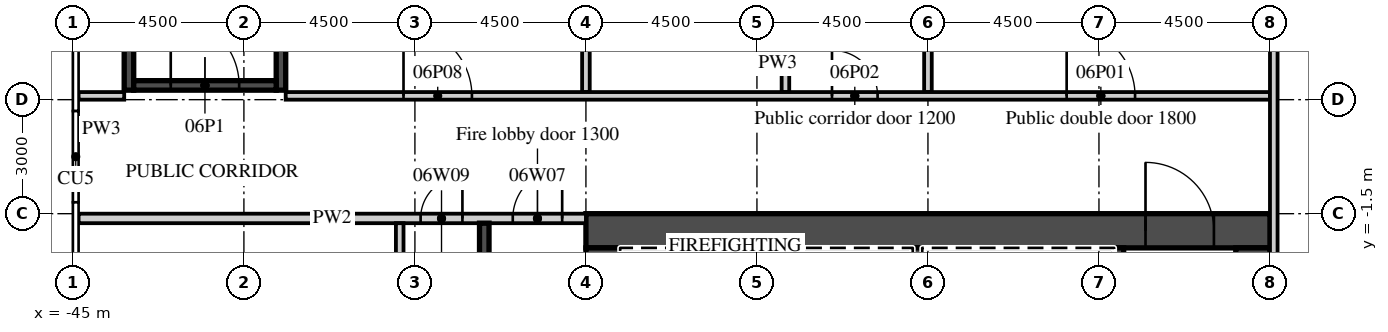
"""IFC4 building model, lengths in metres.
Left out: names, types, materials, properties, quantities, classifications, styles, units other than length and angle.
Written with IfcOpenShell. Run it as: python <this file> out.ifc"""

import sys

from ifc_helpers import new_model, si_unit, direction, frame, frame_2d, origin, place, context, subcontext, project, spatial, rectangle, extrude, element, fill, save


model = new_model("IFC4")
c1 = context("Model", 3, precision=1e-05, world=origin(), true_north=direction((0.0, 1.0)))
c2 = subcontext(c1, "Body", "Model", "MODEL_VIEW")
j1 = project(units=[si_unit("LENGTHUNIT", "METRE"), si_unit("PLANEANGLEUNIT", "RADIAN")], contexts=[c1])
p1 = place(None, origin())
s1 = spatial("IfcSite", under=j1, at=p1, CompositionType="ELEMENT")
p2 = place(p1, origin())
s2 = spatial("IfcBuilding", under=s1, at=p2, CompositionType="ELEMENT")
p3 = place(p2, frame((0.0, 0.0, 38.0)))
s3 = spatial("IfcBuildingStorey", under=s2, at=p3, CompositionType="ELEMENT", Elevation=38.0)
p4 = place(p3, frame((-31.5, -1.95, 0.0), z_axis=(0.0, 0.0, 1.0), x_axis=(1.0, 0.0, 0.0)))
e1 = element("IfcWall", 1, at=p4, inside=s3, PredefinedType="SHEAR", context=c2, shape_type="SweptSolid", body=[
    extrude(rectangle(XDim=18.0, YDim=0.9, at=frame_2d((9.0, 0.0))), origin(), (0.0, 0.0, 1.0), 8.7),
])
p5 = place(p4, frame((14.725, 0.0, 0.0)))
e2 = element("IfcOpeningElement", 2, at=p5, cuts=e1, PredefinedType="OPENING", context=c2, shape_type="SweptSolid", body=[
    extrude(rectangle(XDim=1.8, YDim=2.1, at=frame_2d((0.9, 1.05))), frame((0.0, 0.46, 0.0), z_axis=(0.0, -1.0, 0.0), x_axis=(1.0, 0.0, 0.0)), (0.0, 0.0, 1.0), 0.92),
])
p6 = place(p3, frame((-31.05, -15.2, 0.0), z_axis=(0.0, 0.0, 1.0), x_axis=(0.0, 1.0, 0.0)))
e3 = element("IfcWall", 3, at=p6, inside=s3, PredefinedType="SHEAR", context=c2, shape_type="SweptSolid", body=[
    extrude(rectangle(XDim=12.8, YDim=0.9, at=frame_2d((6.4, 0.0))), origin(), (0.0, 0.0, 1.0), 8.7),
])
p7 = place(p6, frame((11.5, 0.0, 0.0)))
e4 = element("IfcOpeningElement", 4, at=p7, cuts=e3, PredefinedType="OPENING", context=c2, shape_type="SweptSolid", body=[
    extrude(rectangle(XDim=1.1, YDim=2.1, at=frame_2d((0.55, 1.05))), frame((0.0, 0.46, 0.0), z_axis=(0.0, -1.0, 0.0), x_axis=(1.0, 0.0, 0.0)), (0.0, 0.0, 1.0), 0.92),
])
p8 = place(p3, frame((-13.95, -14.6, 0.0), z_axis=(0.0, 0.0, 1.0), x_axis=(0.0, 1.0, 0.0)))
e5 = element("IfcWall", 5, at=p8, inside=s3, PredefinedType="SHEAR", context=c2, shape_type="SweptSolid", body=[
    extrude(rectangle(XDim=12.2, YDim=0.9, at=frame_2d((6.1, 0.0))), origin(), (0.0, 0.0, 1.0), 8.7),
])
p9 = place(p3, frame((-17.475, -5.55, 0.0), z_axis=(0.0, 0.0, 1.0), x_axis=(0.0, 1.0, 0.0)))
e6 = element("IfcWall", 6, at=p9, inside=s3, PredefinedType="SHEAR", context=c2, shape_type="SweptSolid", body=[
    extrude(rectangle(XDim=3.15, YDim=0.25, at=frame_2d((1.575, 0.0))), origin(), (0.0, 0.0, 1.0), 8.7),
])
for number, where, z_axis, x_axis in (
    (7, (-27.975, -5.3, 0.0), (0.0, 0.0, 1.0), (0.0, 1.0, 0.0)),
    (8, (-22.775, -5.3, 0.0), (0.0, 0.0, 1.0), (0.0, 1.0, 0.0)),
):
    element("IfcWall", number, at=place(p3, frame(where, z_axis=z_axis, x_axis=x_axis)), inside=s3, PredefinedType="SHEAR", context=c2, shape_type="SweptSolid", body=[
        extrude(rectangle(XDim=2.9, YDim=0.25, at=frame_2d((1.45, 0.0))), origin(), (0.0, 0.0, 1.0), 8.7),
    ])
p10 = place(p3, frame((-44.85, -1.625, 0.0), z_axis=(0.0, 0.0, 1.0), x_axis=(1.0, 0.0, 0.0)))
e9 = element("IfcWall", 9, at=p10, inside=s3, PredefinedType="PARTITIONING", context=c2, shape_type="SweptSolid", body=[
    extrude(rectangle(XDim=13.35, YDim=0.25, at=frame_2d((6.675, 0.0))), origin(), (0.0, 0.0, 1.0), 8.7),
])
p11 = place(p10, frame((11.425, 0.0, 0.0)))
e10 = element("IfcOpeningElement", 10, at=p11, cuts=e9, PredefinedType="OPENING", context=c2, shape_type="SweptSolid", body=[
    extrude(rectangle(XDim=1.3, YDim=2.1, at=frame_2d((0.65, 1.05))), frame((0.0, 0.135, 0.0), z_axis=(0.0, -1.0, 0.0), x_axis=(1.0, 0.0, 0.0)), (0.0, 0.0, 1.0), 0.27),
])
p12 = place(p10, frame((9.0, 0.0, 0.0)))
e11 = element("IfcOpeningElement", 11, at=p12, cuts=e9, PredefinedType="OPENING", context=c2, shape_type="SweptSolid", body=[
    extrude(rectangle(XDim=1.1, YDim=2.1, at=frame_2d((0.55, 1.05))), frame((0.0, 0.135, 0.0), z_axis=(0.0, -1.0, 0.0), x_axis=(1.0, 0.0, 0.0)), (0.0, 0.0, 1.0), 0.27),
])
p13 = place(p3, frame((-34.175, -10.1, 0.0), z_axis=(0.0, 0.0, 1.0), x_axis=(0.0, 1.0, 0.0)))
e12 = element("IfcWall", 12, at=p13, inside=s3, PredefinedType="SHEAR", context=c2, shape_type="SweptSolid", body=[
    extrude(rectangle(XDim=8.35, YDim=0.25, at=frame_2d((4.175, 0.0))), origin(), (0.0, 0.0, 1.0), 8.7),
])
p14 = place(p3, frame((-36.4, -17.7, 0.0), z_axis=(0.0, 0.0, 1.0), x_axis=(0.0, 1.0, 0.0)))
e13 = element("IfcWall", 13, at=p14, inside=s3, PredefinedType="PARTITIONING", context=c2, shape_type="SweptSolid", body=[
    extrude(rectangle(XDim=15.95, YDim=0.2, at=frame_2d((7.975, 0.0))), origin(), (0.0, 0.0, 1.0), 8.7),
])
p15 = place(p14, frame((0.35, 0.0, 0.0)))
e14 = element("IfcOpeningElement", 14, at=p15, cuts=e13, PredefinedType="OPENING", context=c2, shape_type="SweptSolid", body=[
    extrude(rectangle(XDim=0.9, YDim=2.1, at=frame_2d((0.45, 1.05))), frame((0.0, 0.11, 0.0), z_axis=(0.0, -1.0, 0.0), x_axis=(1.0, 0.0, 0.0)), (0.0, 0.0, 1.0), 0.22),
])
for number, where, z_axis, x_axis in (
    (15, (-43.525, 1.75, 0.0), (0.0, 0.0, 1.0), (0.0, 1.0, 0.0)),
    (16, (-39.525, 1.75, 0.0), (0.0, 0.0, 1.0), (0.0, 1.0, 0.0)),
):
    element("IfcWall", number, at=place(p3, frame(where, z_axis=z_axis, x_axis=x_axis)), inside=s3, PredefinedType="SHEAR", context=c2, shape_type="SweptSolid", body=[
        extrude(rectangle(XDim=7.5, YDim=0.25, at=frame_2d((3.75, 0.0))), origin(), (0.0, 0.0, 1.0), 8.7),
    ])
p16 = place(p3, frame((-43.4, 1.875, 0.0), z_axis=(0.0, 0.0, 1.0), x_axis=(1.0, 0.0, 0.0)))
e17 = element("IfcWall", 17, at=p16, inside=s3, PredefinedType="SHEAR", context=c2, shape_type="SweptSolid", body=[
    extrude(rectangle(XDim=3.75, YDim=0.25, at=frame_2d((1.875, 0.0))), origin(), (0.0, 0.0, 1.0), 8.7),
])
p17 = place(p16, frame((0.975, 0.0, 0.0)))
e18 = element("IfcOpeningElement", 18, at=p17, cuts=e17, PredefinedType="OPENING", context=c2, shape_type="SweptSolid", body=[
    extrude(rectangle(XDim=1.8, YDim=2.1, at=frame_2d((0.9, 1.05))), frame((0.0, 0.135, 0.0), z_axis=(0.0, -1.0, 0.0), x_axis=(1.0, 0.0, 0.0)), (0.0, 0.0, 1.0), 0.27),
])
p18 = place(p3, frame((-22.5, 1.7, 0.0), z_axis=(0.0, 0.0, 1.0), x_axis=(0.0, 1.0, 0.0)))
e19 = element("IfcWall", 19, at=p18, inside=s3, PredefinedType="PARTITIONING", context=c2, shape_type="SweptSolid", body=[
    extrude(rectangle(XDim=19.85, YDim=0.2, at=frame_2d((9.925, 0.0))), origin(), (0.0, 0.0, 1.0), 8.7),
])
p19 = place(p3, frame((-26.25, 1.7, 0.0), z_axis=(0.0, 0.0, 1.0), x_axis=(0.0, 1.0, 0.0)))
e20 = element("IfcWall", 20, at=p19, inside=s3, PredefinedType="PARTITIONING", context=c2, shape_type="SweptSolid", body=[
    extrude(rectangle(XDim=15.65, YDim=0.2, at=frame_2d((7.825, 0.0))), origin(), (0.0, 0.0, 1.0), 8.7),
])
p20 = place(p19, frame((1.75, 0.0, 0.0)))
e21 = element("IfcOpeningElement", 21, at=p20, cuts=e20, PredefinedType="OPENING", context=c2, shape_type="SweptSolid", body=[
    extrude(rectangle(XDim=0.9, YDim=2.1, at=frame_2d((0.45, 1.05))), frame((0.0, 0.11, 0.0), z_axis=(0.0, -1.0, 0.0), x_axis=(1.0, 0.0, 0.0)), (0.0, 0.0, 1.0), 0.22),
])
p21 = place(p19, frame((6.3, 0.0, 0.0)))
e22 = element("IfcOpeningElement", 22, at=p21, cuts=e20, PredefinedType="OPENING", context=c2, shape_type="SweptSolid", body=[
    extrude(rectangle(XDim=0.9, YDim=2.1, at=frame_2d((0.45, 1.05))), frame((0.0, 0.11, 0.0), z_axis=(0.0, -1.0, 0.0), x_axis=(1.0, 0.0, 0.0)), (0.0, 0.0, 1.0), 0.22),
])
p22 = place(p19, frame((10.3, 0.0, 0.0)))
e23 = element("IfcOpeningElement", 23, at=p22, cuts=e20, PredefinedType="OPENING", context=c2, shape_type="SweptSolid", body=[
    extrude(rectangle(XDim=0.9, YDim=2.1, at=frame_2d((0.45, 1.05))), frame((0.0, 0.11, 0.0), z_axis=(0.0, -1.0, 0.0), x_axis=(1.0, 0.0, 0.0)), (0.0, 0.0, 1.0), 0.22),
])
p23 = place(p19, frame((13.725, 0.0, 0.0)))
e24 = element("IfcOpeningElement", 24, at=p23, cuts=e20, PredefinedType="OPENING", context=c2, shape_type="SweptSolid", body=[
    extrude(rectangle(XDim=0.9, YDim=2.1, at=frame_2d((0.45, 1.05))), frame((0.0, 0.11, 0.0), z_axis=(0.0, -1.0, 0.0), x_axis=(1.0, 0.0, 0.0)), (0.0, 0.0, 1.0), 0.22),
])
p24 = place(p3, frame((-31.5, 1.7, 0.0), z_axis=(0.0, 0.0, 1.0), x_axis=(0.0, 1.0, 0.0)))
e25 = element("IfcWall", 25, at=p24, inside=s3, PredefinedType="PARTITIONING", context=c2, shape_type="SweptSolid", body=[
    extrude(rectangle(XDim=19.85, YDim=0.2, at=frame_2d((9.925, 0.0))), origin(), (0.0, 0.0, 1.0), 8.7),
])
p25 = place(p3, frame((-39.4, 1.6, 0.0), z_axis=(0.0, 0.0, 1.0), x_axis=(1.0, 0.0, 0.0)))
e26 = element("IfcWall", 26, at=p25, inside=s3, PredefinedType="PARTITIONING", context=c2, shape_type="SweptSolid", body=[
    extrude(rectangle(XDim=25.9, YDim=0.2, at=frame_2d((12.95, 0.0))), origin(), (0.0, 0.0, 1.0), 8.7),
])
p26 = place(p25, frame((20.55, 0.0, 0.0)))
e27 = element("IfcOpeningElement", 27, at=p26, cuts=e26, PredefinedType="OPENING", context=c2, shape_type="SweptSolid", body=[
    extrude(rectangle(XDim=1.8, YDim=2.1, at=frame_2d((0.9, 1.05))), frame((0.0, 0.11, 0.0), z_axis=(0.0, -1.0, 0.0), x_axis=(1.0, 0.0, 0.0)), (0.0, 0.0, 1.0), 0.22),
])
p27 = place(p25, frame((14.375, 0.0, 0.0)))
e28 = element("IfcOpeningElement", 28, at=p27, cuts=e26, PredefinedType="OPENING", context=c2, shape_type="SweptSolid", body=[
    extrude(rectangle(XDim=1.2, YDim=2.1, at=frame_2d((0.6, 1.05))), frame((0.0, 0.11, 0.0), z_axis=(0.0, -1.0, 0.0), x_axis=(1.0, 0.0, 0.0)), (0.0, 0.0, 1.0), 0.22),
])
p28 = place(p25, frame((3.1, 0.0, 0.0)))
e29 = element("IfcOpeningElement", 29, at=p28, cuts=e26, PredefinedType="OPENING", context=c2, shape_type="SweptSolid", body=[
    extrude(rectangle(XDim=1.8, YDim=2.1, at=frame_2d((0.9, 1.05))), frame((0.0, 0.11, 0.0), z_axis=(0.0, -1.0, 0.0), x_axis=(1.0, 0.0, 0.0)), (0.0, 0.0, 1.0), 0.22),
])
p29 = place(p3, frame((-44.85, 1.6, 0.0), z_axis=(0.0, 0.0, 1.0), x_axis=(1.0, 0.0, 0.0)))
e30 = element("IfcWall", 30, at=p29, inside=s3, PredefinedType="PARTITIONING", context=c2, shape_type="SweptSolid", body=[
    extrude(rectangle(XDim=1.2, YDim=0.2, at=frame_2d((0.6, 0.0))), origin(), (0.0, 0.0, 1.0), 8.7),
])
p30 = place(p3, frame((-13.4, -17.5, 0.0), z_axis=(0.0, 0.0, 1.0), x_axis=(0.0, 1.0, 0.0)))
e31 = element("IfcWall", 31, at=p30, inside=s3, PredefinedType="PARTITIONING", context=c2, shape_type="SweptSolid", body=[
    extrude(rectangle(XDim=35.0, YDim=0.2, at=frame_2d((17.5, 0.0))), origin(), (0.0, 0.0, 1.0), 8.7),
])
p31 = place(p30, frame((22.6, 0.0, 0.0)))
e32 = element("IfcOpeningElement", 32, at=p31, cuts=e31, PredefinedType="OPENING", context=c2, shape_type="SweptSolid", body=[
    extrude(rectangle(XDim=1.8, YDim=2.1, at=frame_2d((0.9, 1.05))), frame((0.0, 0.11, 0.0), z_axis=(0.0, -1.0, 0.0), x_axis=(1.0, 0.0, 0.0)), (0.0, 0.0, 1.0), 0.22),
])
p32 = place(p30, frame((28.6, 0.0, 0.0)))
e33 = element("IfcOpeningElement", 33, at=p32, cuts=e31, PredefinedType="OPENING", context=c2, shape_type="SweptSolid", body=[
    extrude(rectangle(XDim=1.8, YDim=2.1, at=frame_2d((0.9, 1.05))), frame((0.0, 0.11, 0.0), z_axis=(0.0, -1.0, 0.0), x_axis=(1.0, 0.0, 0.0)), (0.0, 0.0, 1.0), 0.22),
])
p33 = place(p5, origin())
e34 = element("IfcDoor", 34, at=p33, inside=s3, OperationType="DOUBLE_DOOR_DOUBLE_SWING", PredefinedType="DOOR", context=c2, shape_type="SweptSolid", body=[
    extrude(rectangle(XDim=1.8, YDim=2.1, at=frame_2d((0.9, 1.05))), frame((0.0, 0.025, 0.0), z_axis=(0.0, -1.0, 0.0), x_axis=(1.0, 0.0, 0.0)), (0.0, 0.0, 1.0), 0.05),
])
fill(e2, e34)
p34 = place(p11, origin())
e35 = element("IfcDoor", 35, at=p34, inside=s3, OperationType="SINGLE_SWING_RIGHT", PredefinedType="DOOR", context=c2, shape_type="SweptSolid", body=[
    extrude(rectangle(XDim=1.3, YDim=2.1, at=frame_2d((0.65, 1.05))), frame((0.0, 0.025, 0.0), z_axis=(0.0, -1.0, 0.0), x_axis=(1.0, 0.0, 0.0)), (0.0, 0.0, 1.0), 0.05),
])
fill(e10, e35)
p35 = place(p12, origin())
e36 = element("IfcDoor", 36, at=p35, inside=s3, OperationType="SINGLE_SWING_RIGHT", PredefinedType="DOOR", context=c2, shape_type="SweptSolid", body=[
    extrude(rectangle(XDim=1.1, YDim=2.1, at=frame_2d((0.55, 1.05))), frame((0.0, 0.025, 0.0), z_axis=(0.0, -1.0, 0.0), x_axis=(1.0, 0.0, 0.0)), (0.0, 0.0, 1.0), 0.05),
])
fill(e11, e36)
p36 = place(p17, origin())
e37 = element("IfcDoor", 37, at=p36, inside=s3, OperationType="DOUBLE_DOOR_DOUBLE_SWING", PredefinedType="DOOR", context=c2, shape_type="SweptSolid", body=[
    extrude(rectangle(XDim=1.8, YDim=2.1, at=frame_2d((0.9, 1.05))), frame((0.0, 0.025, 0.0), z_axis=(0.0, -1.0, 0.0), x_axis=(1.0, 0.0, 0.0)), (0.0, 0.0, 1.0), 0.05),
])
fill(e18, e37)
p37 = place(p26, origin())
e38 = element("IfcDoor", 38, at=p37, inside=s3, OperationType="DOUBLE_DOOR_DOUBLE_SWING", PredefinedType="DOOR", context=c2, shape_type="SweptSolid", body=[
    extrude(rectangle(XDim=1.8, YDim=2.1, at=frame_2d((0.9, 1.05))), frame((0.0, 0.025, 0.0), z_axis=(0.0, -1.0, 0.0), x_axis=(1.0, 0.0, 0.0)), (0.0, 0.0, 1.0), 0.05),
])
fill(e27, e38)
p38 = place(p27, origin())
e39 = element("IfcDoor", 39, at=p38, inside=s3, OperationType="SINGLE_SWING_LEFT", PredefinedType="DOOR", context=c2, shape_type="SweptSolid", body=[
    extrude(rectangle(XDim=1.2, YDim=2.1, at=frame_2d((0.6, 1.05))), frame((0.0, 0.025, 0.0), z_axis=(0.0, -1.0, 0.0), x_axis=(1.0, 0.0, 0.0)), (0.0, 0.0, 1.0), 0.05),
])
fill(e28, e39)
p39 = place(p28, origin())
e40 = element("IfcDoor", 40, at=p39, inside=s3, OperationType="DOUBLE_DOOR_DOUBLE_SWING", PredefinedType="DOOR", context=c2, shape_type="SweptSolid", body=[
    extrude(rectangle(XDim=1.8, YDim=2.1, at=frame_2d((0.9, 1.05))), frame((0.0, 0.025, 0.0), z_axis=(0.0, -1.0, 0.0), x_axis=(1.0, 0.0, 0.0)), (0.0, 0.0, 1.0), 0.05),
])
fill(e29, e40)
save(model, sys.argv[1])
